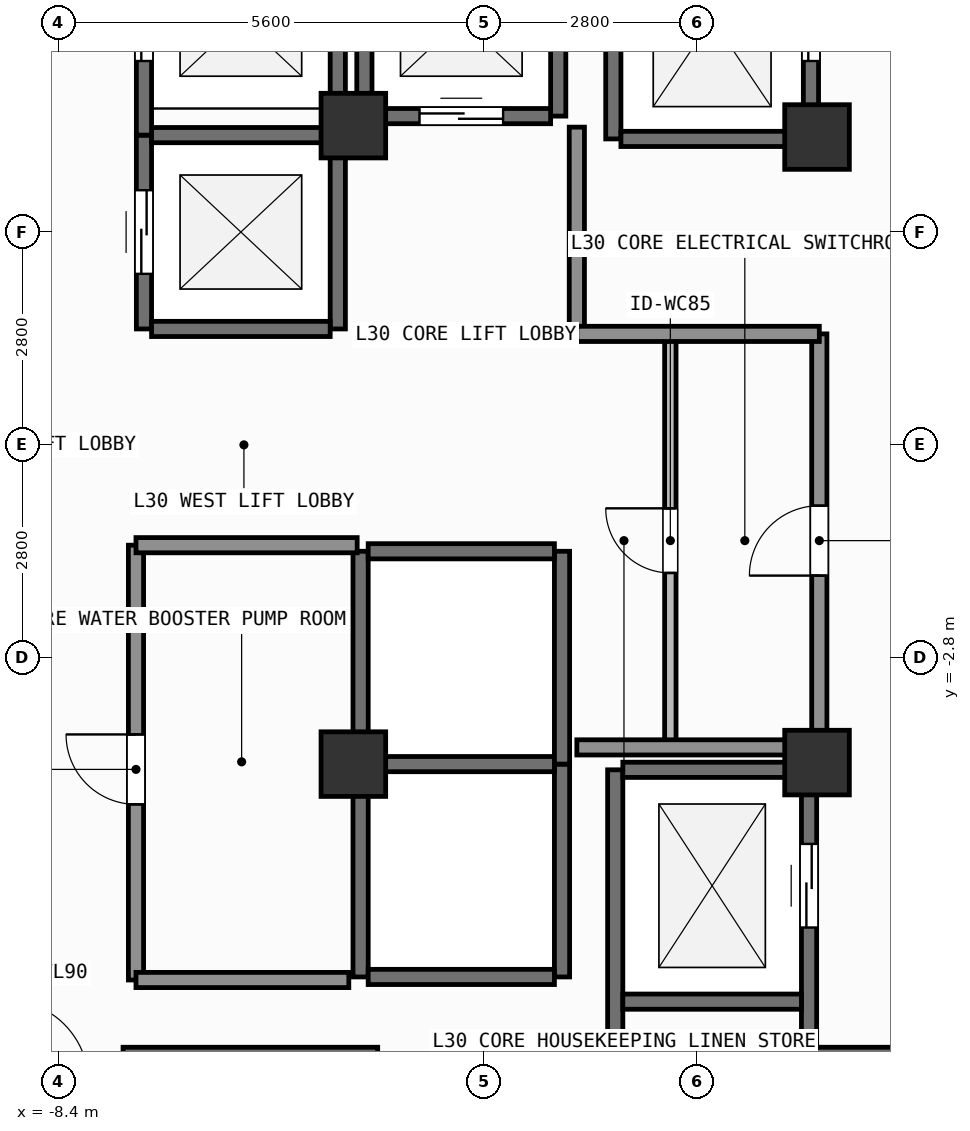
"""IFC4 building model, lengths in metres.
Left out: names, types, materials, properties, quantities, classifications, styles, units other than length and angle.
Written with IfcOpenShell. Run it as: python <this file> out.ifc"""

import sys

from ifc_helpers import new_model, si_unit, direction, frame, frame_2d, origin, origin_2d, place, context, subcontext, project, spatial, rectangle, extrude, element, fill, save


model = new_model("IFC4")
c1 = context("Model", 3, precision=1e-05, world=origin(), true_north=direction((0.0, 1.0)))
c2 = subcontext(c1, "Body", "Model", "MODEL_VIEW")
j1 = project(units=[si_unit("LENGTHUNIT", "METRE"), si_unit("PLANEANGLEUNIT", "RADIAN")], contexts=[c1])
p1 = place(None, origin())
s1 = spatial("IfcSite", under=j1, at=p1, CompositionType="ELEMENT")
p2 = place(p1, origin())
s2 = spatial("IfcBuilding", under=s1, at=p2, CompositionType="ELEMENT")
p3 = place(p2, frame((0.0, 0.0, 121.2)))
s3 = spatial("IfcBuildingStorey", under=s2, at=p3, CompositionType="ELEMENT", Elevation=121.2)
p4 = place(p3, frame((-7.55, -8.4, 0.0), z_axis=(0.0, 0.0, 1.0), x_axis=(1.0, 0.0, 0.0)))
e1 = element("IfcWall", 1, at=p4, inside=s3, PredefinedType="SHEAR", context=c2, shape_type="SweptSolid", body=[
    extrude(rectangle(XDim=3.35, YDim=0.95, at=frame_2d((1.675, 0.0))), origin(), (0.0, 0.0, 1.0), 3.9),
])
p5 = place(p3, frame((-2.62, -8.4, 0.0), z_axis=(0.0, 0.0, 1.0), x_axis=(1.0, 0.0, 0.0)))
e2 = element("IfcWall", 2, at=p5, inside=s3, PredefinedType="SHEAR", context=c2, shape_type="SweptSolid", body=[
    extrude(rectangle(XDim=7.27, YDim=0.95, at=frame_2d((3.635, 0.0))), origin(), (0.0, 0.0, 1.0), 3.9),
])
for number, where, z_axis, x_axis in (
    (3, (-4.52, -4.2, 0.0), (0.0, 0.0, 1.0), (1.0, 0.0, 0.0)),
    (4, (1.58, -4.18, 0.0), (0.0, 0.0, 1.0), (1.0, 0.0, 0.0)),
    (5, (1.58, 4.05, 0.0), (0.0, 0.0, 1.0), (1.0, 0.0, 0.0)),
    (6, (-4.52, 4.2, 0.0), (0.0, 0.0, 1.0), (1.0, 0.0, 0.0)),
):
    element("IfcColumn", number, at=place(p3, frame(where, z_axis=z_axis, x_axis=x_axis)), inside=s3, PredefinedType="COLUMN", context=c2, shape_type="SweptSolid", body=[
        extrude(rectangle(XDim=0.85, YDim=0.85, at=origin_2d()), origin(), (0.0, 0.0, 1.0), 3.9),
    ])
p6 = place(p3, frame((-7.275, 1.525, 0.0), z_axis=(0.0, 0.0, 1.0), x_axis=(0.0, 1.0, 0.0)))
e7 = element("IfcWall", 7, at=p6, inside=s3, PredefinedType="SHEAR", context=c2, shape_type="SweptSolid", body=[
    extrude(rectangle(XDim=2.55, YDim=0.2, at=frame_2d((1.275, 0.0))), origin(), (0.0, 0.0, 1.0), 3.68),
])
p7 = place(p6, frame((0.725, 0.0, 0.0)))
e8 = element("IfcOpeningElement", 8, at=p7, cuts=e7, PredefinedType="OPENING", context=c2, shape_type="SweptSolid", body=[
    extrude(rectangle(XDim=1.1, YDim=2.2, at=frame_2d((0.55, 1.1))), frame((0.0, 0.11, 0.0), z_axis=(0.0, -1.0, 0.0), x_axis=(1.0, 0.0, 0.0)), (0.0, 0.0, 1.0), 0.22),
])
p8 = place(p3, frame((-4.725, 1.525, 0.0), z_axis=(0.0, 0.0, 1.0), x_axis=(0.0, 1.0, 0.0)))
e9 = element("IfcWall", 9, at=p8, inside=s3, PredefinedType="SHEAR", context=c2, shape_type="SweptSolid", body=[
    extrude(rectangle(XDim=2.55, YDim=0.2, at=frame_2d((1.275, 0.0))), origin(), (0.0, 0.0, 1.0), 3.68),
])
for number, where, z_axis, x_axis in (
    (10, (-7.175, 1.525, 0.0), (0.0, 0.0, 1.0), (1.0, 0.0, 0.0)),
    (11, (-7.175, 4.075, 0.0), (0.0, 0.0, 1.0), (1.0, 0.0, 0.0)),
):
    element("IfcWall", number, at=place(p3, frame(where, z_axis=z_axis, x_axis=x_axis)), inside=s3, PredefinedType="SHEAR", context=c2, shape_type="SweptSolid", body=[
        extrude(rectangle(XDim=2.35, YDim=0.2, at=frame_2d((1.175, 0.0))), origin(), (0.0, 0.0, 1.0), 3.68),
    ])
p9 = place(p3, frame((-7.275, 4.075, 0.0), z_axis=(0.0, 0.0, 1.0), x_axis=(0.0, 1.0, 0.0)))
e12 = element("IfcWall", 12, at=p9, inside=s3, PredefinedType="SHEAR", context=c2, shape_type="SweptSolid", body=[
    extrude(rectangle(XDim=2.8, YDim=0.2, at=frame_2d((1.4, 0.0))), origin(), (0.0, 0.0, 1.0), 3.68),
])
p10 = place(p9, frame((0.975, 0.0, 0.0)))
e13 = element("IfcOpeningElement", 13, at=p10, cuts=e12, PredefinedType="OPENING", context=c2, shape_type="SweptSolid", body=[
    extrude(rectangle(XDim=1.1, YDim=2.2, at=frame_2d((0.55, 1.1))), frame((0.0, 0.11, 0.0), z_axis=(0.0, -1.0, 0.0), x_axis=(1.0, 0.0, 0.0)), (0.0, 0.0, 1.0), 0.22),
])
p11 = place(p3, frame((-4.725, 4.075, 0.0), z_axis=(0.0, 0.0, 1.0), x_axis=(0.0, 1.0, 0.0)))
e14 = element("IfcWall", 14, at=p11, inside=s3, PredefinedType="SHEAR", context=c2, shape_type="SweptSolid", body=[
    extrude(rectangle(XDim=2.8, YDim=0.2, at=frame_2d((1.4, 0.0))), origin(), (0.0, 0.0, 1.0), 3.68),
])
for number, where, z_axis, x_axis in (
    (15, (-4.375, 4.325, 0.0), (0.0, 0.0, 1.0), (0.0, 1.0, 0.0)),
    (16, (-1.825, 4.325, 0.0), (0.0, 0.0, 1.0), (0.0, 1.0, 0.0)),
):
    element("IfcWall", number, at=place(p3, frame(where, z_axis=z_axis, x_axis=x_axis)), inside=s3, PredefinedType="SHEAR", context=c2, shape_type="SweptSolid", body=[
        extrude(rectangle(XDim=2.55, YDim=0.2, at=frame_2d((1.275, 0.0))), origin(), (0.0, 0.0, 1.0), 3.68),
    ])
p12 = place(p3, frame((-4.275, 4.325, 0.0), z_axis=(0.0, 0.0, 1.0), x_axis=(1.0, 0.0, 0.0)))
e17 = element("IfcWall", 17, at=p12, inside=s3, PredefinedType="SHEAR", context=c2, shape_type="SweptSolid", body=[
    extrude(rectangle(XDim=2.35, YDim=0.2, at=frame_2d((1.175, 0.0))), origin(), (0.0, 0.0, 1.0), 3.68),
])
p13 = place(p12, frame((0.625, 0.0, 0.0)))
e18 = element("IfcOpeningElement", 18, at=p13, cuts=e17, PredefinedType="OPENING", context=c2, shape_type="SweptSolid", body=[
    extrude(rectangle(XDim=1.1, YDim=2.2, at=frame_2d((0.55, 1.1))), frame((0.0, 0.11, 0.0), z_axis=(0.0, -1.0, 0.0), x_axis=(1.0, 0.0, 0.0)), (0.0, 0.0, 1.0), 0.22),
])
for number, where, z_axis, x_axis in (
    (19, (-4.425, -7.0, 0.0), (0.0, 0.0, 1.0), (0.0, 1.0, 0.0)),
    (20, (-1.775, -7.0, 0.0), (0.0, 0.0, 1.0), (0.0, 1.0, 0.0)),
):
    element("IfcWall", number, at=place(p3, frame(where, z_axis=z_axis, x_axis=x_axis)), inside=s3, PredefinedType="SHEAR", context=c2, shape_type="SweptSolid", body=[
        extrude(rectangle(XDim=2.8, YDim=0.2, at=frame_2d((1.4, 0.0))), origin(), (0.0, 0.0, 1.0), 3.68),
    ])
for number, where, z_axis, x_axis in (
    (21, (-4.325, -7.0, 0.0), (0.0, 0.0, 1.0), (1.0, 0.0, 0.0)),
    (22, (-4.325, -4.2, 0.0), (0.0, 0.0, 1.0), (1.0, 0.0, 0.0)),
):
    element("IfcWall", number, at=place(p3, frame(where, z_axis=z_axis, x_axis=x_axis)), inside=s3, PredefinedType="SHEAR", context=c2, shape_type="SweptSolid", body=[
        extrude(rectangle(XDim=2.45, YDim=0.2, at=frame_2d((1.225, 0.0))), origin(), (0.0, 0.0, 1.0), 3.68),
    ])
for number, where, z_axis, x_axis in (
    (23, (-4.425, -4.2, 0.0), (0.0, 0.0, 1.0), (0.0, 1.0, 0.0)),
    (24, (-1.775, -4.2, 0.0), (0.0, 0.0, 1.0), (0.0, 1.0, 0.0)),
):
    element("IfcWall", number, at=place(p3, frame(where, z_axis=z_axis, x_axis=x_axis)), inside=s3, PredefinedType="SHEAR", context=c2, shape_type="SweptSolid", body=[
        extrude(rectangle(XDim=2.8, YDim=0.2, at=frame_2d((1.4, 0.0))), origin(), (0.0, 0.0, 1.0), 3.68),
    ])
p14 = place(p3, frame((-4.325, -1.4, 0.0), z_axis=(0.0, 0.0, 1.0), x_axis=(1.0, 0.0, 0.0)))
e25 = element("IfcWall", 25, at=p14, inside=s3, PredefinedType="SHEAR", context=c2, shape_type="SweptSolid", body=[
    extrude(rectangle(XDim=2.45, YDim=0.2, at=frame_2d((1.225, 0.0))), origin(), (0.0, 0.0, 1.0), 3.68),
])
p15 = place(p3, frame((-1.1, 4.025, 0.0), z_axis=(0.0, 0.0, 1.0), x_axis=(0.0, 1.0, 0.0)))
e26 = element("IfcWall", 26, at=p15, inside=s3, PredefinedType="SHEAR", context=c2, shape_type="SweptSolid", body=[
    extrude(rectangle(XDim=3.15, YDim=0.2, at=frame_2d((1.575, 0.0))), origin(), (0.0, 0.0, 1.0), 3.68),
])
p16 = place(p3, frame((1.5, 4.025, 0.0), z_axis=(0.0, 0.0, 1.0), x_axis=(0.0, 1.0, 0.0)))
e27 = element("IfcWall", 27, at=p16, inside=s3, PredefinedType="SHEAR", context=c2, shape_type="SweptSolid", body=[
    extrude(rectangle(XDim=3.15, YDim=0.2, at=frame_2d((1.575, 0.0))), origin(), (0.0, 0.0, 1.0), 3.68),
])
p17 = place(p16, frame((1.025, 0.0, 0.0)))
e28 = element("IfcOpeningElement", 28, at=p17, cuts=e27, PredefinedType="OPENING", context=c2, shape_type="SweptSolid", body=[
    extrude(rectangle(XDim=1.1, YDim=2.2, at=frame_2d((0.55, 1.1))), frame((0.0, 0.11, 0.0), z_axis=(0.0, -1.0, 0.0), x_axis=(1.0, 0.0, 0.0)), (0.0, 0.0, 1.0), 0.22),
])
p18 = place(p3, frame((-1.0, 4.025, 0.0), z_axis=(0.0, 0.0, 1.0), x_axis=(1.0, 0.0, 0.0)))
e29 = element("IfcWall", 29, at=p18, inside=s3, PredefinedType="SHEAR", context=c2, shape_type="SweptSolid", body=[
    extrude(rectangle(XDim=2.4, YDim=0.2, at=frame_2d((1.2, 0.0))), origin(), (0.0, 0.0, 1.0), 3.68),
])
p19 = place(p3, frame((-1.075, -7.925, 0.0), z_axis=(0.0, 0.0, 1.0), x_axis=(0.0, 1.0, 0.0)))
e30 = element("IfcWall", 30, at=p19, inside=s3, PredefinedType="SHEAR", context=c2, shape_type="SweptSolid", body=[
    extrude(rectangle(XDim=3.65, YDim=0.2, at=frame_2d((1.825, 0.0))), origin(), (0.0, 0.0, 1.0), 3.68),
])
p20 = place(p3, frame((1.475, -7.925, 0.0), z_axis=(0.0, 0.0, 1.0), x_axis=(0.0, 1.0, 0.0)))
e31 = element("IfcWall", 31, at=p20, inside=s3, PredefinedType="SHEAR", context=c2, shape_type="SweptSolid", body=[
    extrude(rectangle(XDim=3.65, YDim=0.2, at=frame_2d((1.825, 0.0))), origin(), (0.0, 0.0, 1.0), 3.68),
])
p21 = place(p20, frame((1.575, 0.0, 0.0)))
e32 = element("IfcOpeningElement", 32, at=p21, cuts=e31, PredefinedType="OPENING", context=c2, shape_type="SweptSolid", body=[
    extrude(rectangle(XDim=1.1, YDim=2.2, at=frame_2d((0.55, 1.1))), frame((0.0, 0.11, 0.0), z_axis=(0.0, -1.0, 0.0), x_axis=(1.0, 0.0, 0.0)), (0.0, 0.0, 1.0), 0.22),
])
for number, where, z_axis, x_axis in (
    (33, (-0.975, -7.325, 0.0), (0.0, 0.0, 1.0), (1.0, 0.0, 0.0)),
    (34, (-0.975, -4.275, 0.0), (0.0, 0.0, 1.0), (1.0, 0.0, 0.0)),
):
    element("IfcWall", number, at=place(p3, frame(where, z_axis=z_axis, x_axis=x_axis)), inside=s3, PredefinedType="SHEAR", context=c2, shape_type="SweptSolid", body=[
        extrude(rectangle(XDim=2.35, YDim=0.2, at=frame_2d((1.175, 0.0))), origin(), (0.0, 0.0, 1.0), 3.68),
    ])
p22 = place(p3, frame((-0.35, -3.98, 0.0), z_axis=(0.0, 0.0, 1.0), x_axis=(0.0, 1.0, 0.0)))
e35 = element("IfcWall", 35, at=p22, inside=s3, PredefinedType="PARTITIONING", context=c2, shape_type="SweptSolid", body=[
    extrude(rectangle(XDim=5.44, YDim=0.15, at=frame_2d((2.72, 0.0))), origin(), (0.0, 0.0, 1.0), 3.68),
])
p23 = place(p22, frame((2.295, 0.0, 0.0)))
e36 = element("IfcOpeningElement", 36, at=p23, cuts=e35, PredefinedType="OPENING", context=c2, shape_type="SweptSolid", body=[
    extrude(rectangle(XDim=0.85, YDim=2.1, at=frame_2d((0.425, 1.05))), frame((0.0, 0.085, 0.0), z_axis=(0.0, -1.0, 0.0), x_axis=(1.0, 0.0, 0.0)), (0.0, 0.0, 1.0), 0.17),
])
p24 = place(p3, frame((1.61, -3.98, 0.0), z_axis=(0.0, 0.0, 1.0), x_axis=(0.0, 1.0, 0.0)))
e37 = element("IfcWall", 37, at=p24, inside=s3, PredefinedType="SOLIDWALL", context=c2, shape_type="SweptSolid", body=[
    extrude(rectangle(XDim=5.44, YDim=0.2, at=frame_2d((2.72, 0.0))), origin(), (0.0, 0.0, 1.0), 3.68),
])
p25 = place(p24, frame((2.26, 0.0, 0.0)))
e38 = element("IfcOpeningElement", 38, at=p25, cuts=e37, PredefinedType="OPENING", context=c2, shape_type="SweptSolid", body=[
    extrude(rectangle(XDim=0.92, YDim=2.1, at=frame_2d((0.46, 1.05))), frame((0.0, 0.11, 0.0), z_axis=(0.0, -1.0, 0.0), x_axis=(1.0, 0.0, 0.0)), (0.0, 0.0, 1.0), 0.22),
])
p26 = place(p3, frame((-7.38, -7.04, 0.0), z_axis=(0.0, 0.0, 1.0), x_axis=(0.0, 1.0, 0.0)))
e39 = element("IfcWall", 39, at=p26, inside=s3, PredefinedType="SOLIDWALL", context=c2, shape_type="SweptSolid", body=[
    extrude(rectangle(XDim=5.72, YDim=0.2, at=frame_2d((2.86, 0.0))), origin(), (0.0, 0.0, 1.0), 3.68),
])
p27 = place(p26, frame((2.31, 0.0, 0.0)))
e40 = element("IfcOpeningElement", 40, at=p27, cuts=e39, PredefinedType="OPENING", context=c2, shape_type="SweptSolid", body=[
    extrude(rectangle(XDim=0.92, YDim=2.1, at=frame_2d((0.46, 1.05))), frame((0.0, 0.11, 0.0), z_axis=(0.0, -1.0, 0.0), x_axis=(1.0, 0.0, 0.0)), (0.0, 0.0, 1.0), 0.22),
])
p28 = place(p3, frame((-7.38, -1.32, 0.0), z_axis=(0.0, 0.0, 1.0), x_axis=(1.0, 0.0, 0.0)))
e41 = element("IfcWall", 41, at=p28, inside=s3, PredefinedType="SOLIDWALL", context=c2, shape_type="SweptSolid", body=[
    extrude(rectangle(XDim=2.91, YDim=0.2, at=frame_2d((1.455, 0.0))), origin(), (0.0, 0.0, 1.0), 3.68),
])
p29 = place(p3, frame((-1.58, 1.48, 0.0), z_axis=(0.0, 0.0, 1.0), x_axis=(0.0, 1.0, 0.0)))
e42 = element("IfcWall", 42, at=p29, inside=s3, PredefinedType="SOLIDWALL", context=c2, shape_type="SweptSolid", body=[
    extrude(rectangle(XDim=2.7, YDim=0.2, at=frame_2d((1.35, 0.0))), origin(), (0.0, 0.0, 1.0), 3.68),
])
for number, where, z_axis, x_axis in (
    (43, (-1.58, -3.98, 0.0), (0.0, 0.0, 1.0), (1.0, 0.0, 0.0)),
    (44, (-1.58, 1.46, 0.0), (0.0, 0.0, 1.0), (1.0, 0.0, 0.0)),
):
    element("IfcWall", number, at=place(p3, frame(where, z_axis=z_axis, x_axis=x_axis)), inside=s3, PredefinedType="SOLIDWALL", context=c2, shape_type="SweptSolid", body=[
        extrude(rectangle(XDim=3.19, YDim=0.2, at=frame_2d((1.595, 0.0))), origin(), (0.0, 0.0, 1.0), 3.68),
    ])
p30 = place(p3, frame((-7.38, -7.04, 0.0), z_axis=(0.0, 0.0, 1.0), x_axis=(1.0, 0.0, 0.0)))
e45 = element("IfcWall", 45, at=p30, inside=s3, PredefinedType="SOLIDWALL", context=c2, shape_type="SweptSolid", body=[
    extrude(rectangle(XDim=2.8, YDim=0.2, at=frame_2d((1.4, 0.0))), origin(), (0.0, 0.0, 1.0), 3.68),
])
p31 = place(p7, origin())
e46 = element("IfcDoor", 46, at=p31, inside=s3, OperationType="SLIDING_TO_LEFT", PredefinedType="DOOR", context=c2, shape_type="SweptSolid", body=[
    extrude(rectangle(XDim=1.1, YDim=2.2, at=frame_2d((0.55, 1.1))), frame((0.0, 0.025, 0.0), z_axis=(0.0, -1.0, 0.0), x_axis=(1.0, 0.0, 0.0)), (0.0, 0.0, 1.0), 0.05),
])
fill(e8, e46)
p32 = place(p10, origin())
e47 = element("IfcDoor", 47, at=p32, inside=s3, OperationType="SLIDING_TO_LEFT", PredefinedType="DOOR", context=c2, shape_type="SweptSolid", body=[
    extrude(rectangle(XDim=1.1, YDim=2.2, at=frame_2d((0.55, 1.1))), frame((0.0, 0.025, 0.0), z_axis=(0.0, -1.0, 0.0), x_axis=(1.0, 0.0, 0.0)), (0.0, 0.0, 1.0), 0.05),
])
fill(e13, e47)
p33 = place(p13, origin())
e48 = element("IfcDoor", 48, at=p33, inside=s3, OperationType="SLIDING_TO_LEFT", PredefinedType="DOOR", context=c2, shape_type="SweptSolid", body=[
    extrude(rectangle(XDim=1.1, YDim=2.2, at=frame_2d((0.55, 1.1))), frame((0.0, 0.025, 0.0), z_axis=(0.0, -1.0, 0.0), x_axis=(1.0, 0.0, 0.0)), (0.0, 0.0, 1.0), 0.05),
])
fill(e18, e48)
p34 = place(p17, origin())
e49 = element("IfcDoor", 49, at=p34, inside=s3, OperationType="SLIDING_TO_LEFT", PredefinedType="DOOR", context=c2, shape_type="SweptSolid", body=[
    extrude(rectangle(XDim=1.1, YDim=2.2, at=frame_2d((0.55, 1.1))), frame((0.0, 0.025, 0.0), z_axis=(0.0, -1.0, 0.0), x_axis=(1.0, 0.0, 0.0)), (0.0, 0.0, 1.0), 0.05),
])
fill(e28, e49)
p35 = place(p21, origin())
e50 = element("IfcDoor", 50, at=p35, inside=s3, OperationType="SLIDING_TO_LEFT", PredefinedType="DOOR", context=c2, shape_type="SweptSolid", body=[
    extrude(rectangle(XDim=1.1, YDim=2.2, at=frame_2d((0.55, 1.1))), frame((0.0, 0.025, 0.0), z_axis=(0.0, -1.0, 0.0), x_axis=(1.0, 0.0, 0.0)), (0.0, 0.0, 1.0), 0.05),
])
fill(e32, e50)
p36 = place(p23, origin())
e51 = element("IfcDoor", 51, at=p36, inside=s3, OperationType="SINGLE_SWING_RIGHT", PredefinedType="DOOR", context=c2, shape_type="SweptSolid", body=[
    extrude(rectangle(XDim=0.85, YDim=2.1, at=frame_2d((0.425, 1.05))), frame((0.0, 0.025, 0.0), z_axis=(0.0, -1.0, 0.0), x_axis=(1.0, 0.0, 0.0)), (0.0, 0.0, 1.0), 0.05),
])
fill(e36, e51)
p37 = place(p25, origin())
e52 = element("IfcDoor", 52, at=p37, inside=s3, OperationType="SINGLE_SWING_LEFT", PredefinedType="DOOR", context=c2, shape_type="SweptSolid", body=[
    extrude(rectangle(XDim=0.92, YDim=2.1, at=frame_2d((0.46, 1.05))), frame((0.0, 0.025, 0.0), z_axis=(0.0, -1.0, 0.0), x_axis=(1.0, 0.0, 0.0)), (0.0, 0.0, 1.0), 0.05),
])
fill(e38, e52)
p38 = place(p27, origin())
e53 = element("IfcDoor", 53, at=p38, inside=s3, OperationType="SINGLE_SWING_RIGHT", PredefinedType="DOOR", context=c2, shape_type="SweptSolid", body=[
    extrude(rectangle(XDim=0.92, YDim=2.1, at=frame_2d((0.46, 1.05))), frame((0.0, 0.025, 0.0), z_axis=(0.0, -1.0, 0.0), x_axis=(1.0, 0.0, 0.0)), (0.0, 0.0, 1.0), 0.05),
])
fill(e40, e53)
save(model, sys.argv[1])
